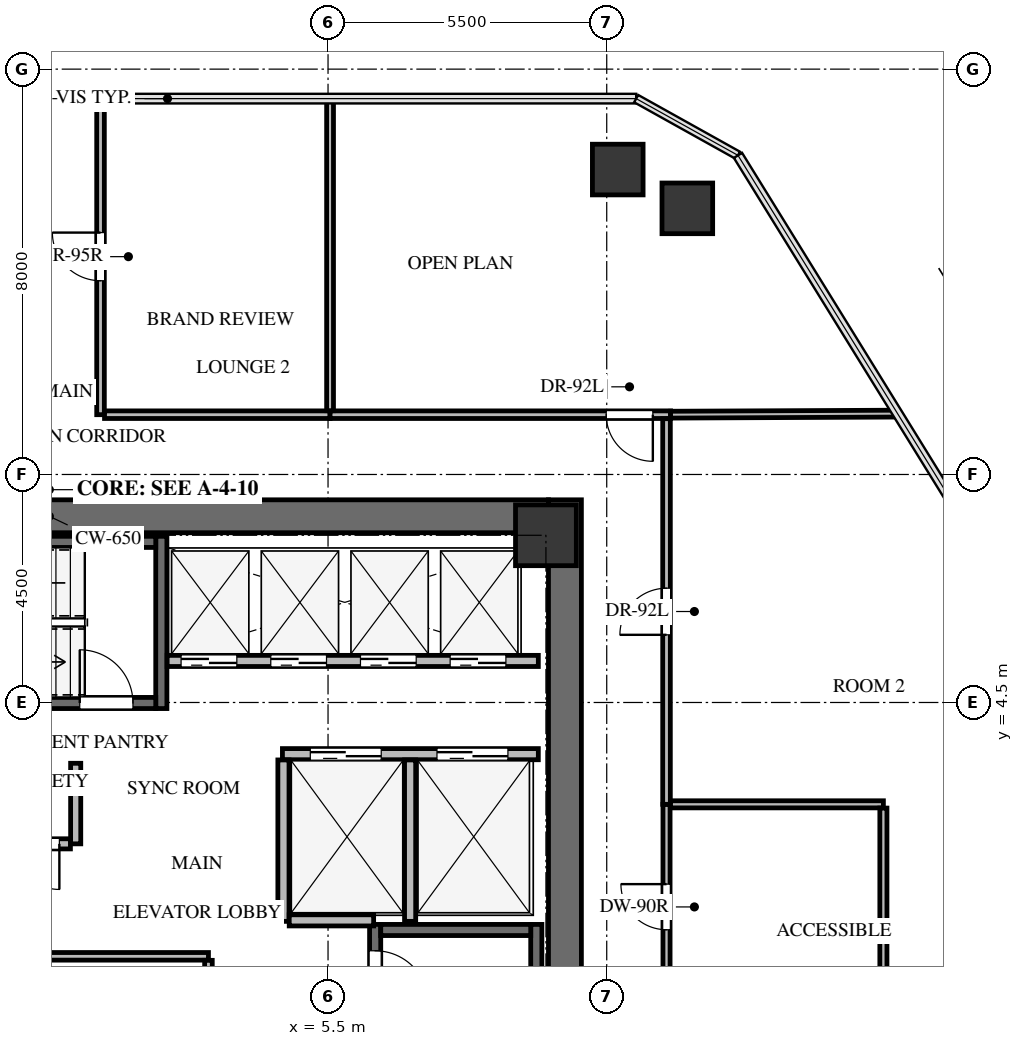
"""IFC4 building model, lengths in metres.
Left out: names, types, materials, properties, quantities, classifications, styles, units other than length and angle.
Written with IfcOpenShell. Run it as: python <this file> out.ifc"""

import sys

from ifc_helpers import new_model, si_unit, direction, frame, frame_2d, origin, origin_2d, place, context, subcontext, project, spatial, rectangle, extrude, source, transform, mapped, element, fill, save


model = new_model("IFC4")
c1 = context("Model", 3, precision=1e-05, world=origin(), true_north=direction((0.0, 1.0)))
c2 = subcontext(c1, "Body", "Model", "MODEL_VIEW")
j1 = project(units=[si_unit("LENGTHUNIT", "METRE"), si_unit("PLANEANGLEUNIT", "RADIAN")], contexts=[c1])
p1 = place(None, origin())
s1 = spatial("IfcSite", under=j1, at=p1, CompositionType="ELEMENT")
p2 = place(p1, origin())
s2 = spatial("IfcBuilding", under=s1, at=p2, CompositionType="ELEMENT")
p3 = place(p2, frame((0.0, 0.0, 193.6)))
s3 = spatial("IfcBuildingStorey", under=s2, at=p3, CompositionType="ELEMENT", Elevation=193.6)
p4 = place(p3, frame((10.175, -8.5, 0.0), z_axis=(0.0, 0.0, 1.0), x_axis=(0.0, 1.0, 0.0)))
e1 = element("IfcWall", 1, at=p4, inside=s3, PredefinedType="SHEAR", context=c2, shape_type="SweptSolid", body=[
    extrude(rectangle(XDim=17.0, YDim=0.65, at=frame_2d((8.5, 0.0))), origin(), (0.0, 0.0, 1.0), 3.3),
])
p5 = place(p3, frame((-9.85, 8.175, 0.0), z_axis=(0.0, 0.0, 1.0), x_axis=(1.0, 0.0, 0.0)))
e2 = element("IfcWall", 2, at=p5, inside=s3, PredefinedType="SHEAR", context=c2, shape_type="SweptSolid", body=[
    extrude(rectangle(XDim=19.7, YDim=0.65, at=frame_2d((9.85, 0.0))), origin(), (0.0, 0.0, 1.0), 3.3),
])
p6 = place(p3, frame((9.61, -7.77, -0.24), z_axis=(0.0, 0.0, 1.0), x_axis=(0.0, 1.0, 0.0)))
e3 = element("IfcWall", 3, at=p6, inside=s3, PredefinedType="SHEAR", context=c2, shape_type="SweptSolid", body=[
    extrude(rectangle(XDim=7.89, YDim=0.22, at=frame_2d((3.945, 0.0))), origin(), (0.0, 0.0, 1.0), 3.3),
])
p7 = place(p3, frame((6.43, 0.12, -0.24), z_axis=(0.0, 0.0, 1.0), x_axis=(0.0, -1.0, 0.0)))
e4 = element("IfcWall", 4, at=p7, inside=s3, PredefinedType="SHEAR", context=c2, shape_type="SweptSolid", body=[
    extrude(rectangle(XDim=7.89, YDim=0.22, at=frame_2d((3.945, 0.0))), origin(), (0.0, 0.0, 1.0), 3.3),
])
p8 = place(p7, frame((0.52, 0.0, 0.0)))
e5 = element("IfcOpeningElement", 5, at=p8, cuts=e4, PredefinedType="OPENING", context=c2, shape_type="SweptSolid", body=[
    extrude(rectangle(XDim=1.05, YDim=2.15, at=frame_2d((0.525, 1.075))), frame((0.0, 0.12, 0.0), z_axis=(0.0, -1.0, 0.0), x_axis=(1.0, 0.0, 0.0)), (0.0, 0.0, 1.0), 0.24),
])
p9 = place(p3, frame((9.5, 0.01, -0.24), z_axis=(0.0, 0.0, 1.0), x_axis=(-1.0, 0.0, 0.0)))
e6 = element("IfcWall", 6, at=p9, inside=s3, PredefinedType="SHEAR", context=c2, shape_type="SweptSolid", body=[
    extrude(rectangle(XDim=2.96, YDim=0.22, at=frame_2d((1.48, 0.0))), origin(), (0.0, 0.0, 1.0), 3.3),
])
p10 = place(p3, frame((2.21, 4.38, -0.24), z_axis=(0.0, 0.0, 1.0), x_axis=(0.0, 1.0, 0.0)))
e7 = element("IfcWall", 7, at=p10, inside=s3, PredefinedType="SHEAR", context=c2, shape_type="SweptSolid", body=[
    extrude(rectangle(XDim=3.4, YDim=0.22, at=frame_2d((1.7, 0.0))), origin(), (0.0, 0.0, 1.0), 3.3),
])
p11 = place(p3, frame((-5.25, 4.49, -0.24), z_axis=(0.0, 0.0, 1.0), x_axis=(1.0, 0.0, 0.0)))
e8 = element("IfcWall", 8, at=p11, inside=s3, PredefinedType="SHEAR", context=c2, shape_type="SweptSolid", body=[
    extrude(rectangle(XDim=7.35, YDim=0.22, at=frame_2d((3.675, 0.0))), origin(), (0.0, 0.0, 1.0), 3.3),
])
p12 = place(p11, frame((5.85, 0.0, 0.0)))
e9 = element("IfcOpeningElement", 9, at=p12, cuts=e8, PredefinedType="OPENING", context=c2, shape_type="SweptSolid", body=[
    extrude(rectangle(XDim=1.05, YDim=2.15, at=frame_2d((0.525, 1.075))), frame((0.0, 0.12, 0.0), z_axis=(0.0, -1.0, 0.0), x_axis=(1.0, 0.0, 0.0)), (0.0, 0.0, 1.0), 0.24),
])
p13 = place(p3, frame((2.1, 7.67, -0.24), z_axis=(0.0, 0.0, 1.0), x_axis=(-1.0, 0.0, 0.0)))
e10 = element("IfcWall", 10, at=p13, inside=s3, PredefinedType="SHEAR", context=c2, shape_type="SweptSolid", body=[
    extrude(rectangle(XDim=7.35, YDim=0.22, at=frame_2d((3.675, 0.0))), origin(), (0.0, 0.0, 1.0), 3.3),
])
m1 = source(origin(), c2, "Body", "SweptSolid", [
    extrude(rectangle(XDim=1.2, YDim=1.2, at=origin_2d()), origin(), (0.0, 0.0, 1.0), 3.3),
])
p14 = place(p3, frame((9.8, 7.8, -0.24), z_axis=(0.0, 0.0, 1.0), x_axis=(1.0, 0.0, 0.0)))
e11 = element("IfcColumn", 11, at=p14, inside=s3, PredefinedType="COLUMN", context=c2, shape_type="MappedRepresentation", body=[
    mapped(m1, transform((0.0, 0.0, 0.0), x_axis=(1.0, 0.0, 0.0), y_axis=(0.0, 1.0, 0.0), z_axis=(0.0, 0.0, 1.0), scale=1.0)),
])
m2 = source(origin(), c2, "Body", "SweptSolid", [
    extrude(rectangle(XDim=1.0, YDim=1.0, at=origin_2d()), origin(), (0.0, 0.0, 1.0), 3.3),
])
for number, where, z_axis, x_axis in (
    (12, (11.218, 15.018, -0.24), (0.0, 0.0, 1.0), (1.0, 0.0, 0.0)),
    (13, (12.591, 14.252, -0.24), (0.0, 0.0, 1.0), (1.0, 0.0, 0.0)),
):
    element("IfcColumn", number, at=place(p3, frame(where, z_axis=z_axis, x_axis=x_axis)), inside=s3, PredefinedType="COLUMN", context=c2, shape_type="MappedRepresentation", body=[
        mapped(m2, transform((0.0, 0.0, 0.0), x_axis=(1.0, 0.0, 0.0), y_axis=(0.0, 1.0, 0.0), z_axis=(0.0, 0.0, 1.0), scale=1.0)),
    ])
p15 = place(p3, frame((4.6, 3.48, 0.0), z_axis=(0.0, 0.0, 1.0), x_axis=(1.0, 0.0, 0.0)))
e14 = element("IfcWall", 14, at=p15, inside=s3, PredefinedType="SOLIDWALL", context=c2, shape_type="SweptSolid", body=[
    extrude(rectangle(XDim=5.05, YDim=0.22, at=frame_2d((2.525, 0.0))), origin(), (0.0, 0.0, 1.0), 3.045),
])
p16 = place(p15, frame((0.55, 0.0, 0.0)))
e15 = element("IfcOpeningElement", 15, at=p16, cuts=e14, PredefinedType="OPENING", context=c2, shape_type="SweptSolid", body=[
    extrude(rectangle(XDim=1.4, YDim=2.15, at=frame_2d((0.7, 1.075))), frame((0.0, 0.12, 0.0), z_axis=(0.0, -1.0, 0.0), x_axis=(1.0, 0.0, 0.0)), (0.0, 0.0, 1.0), 0.24),
])
p17 = place(p15, frame((3.05, 0.0, 0.0)))
e16 = element("IfcOpeningElement", 16, at=p17, cuts=e14, PredefinedType="OPENING", context=c2, shape_type="SweptSolid", body=[
    extrude(rectangle(XDim=1.4, YDim=2.15, at=frame_2d((0.7, 1.075))), frame((0.0, 0.12, 0.0), z_axis=(0.0, -1.0, 0.0), x_axis=(1.0, 0.0, 0.0)), (0.0, 0.0, 1.0), 0.24),
])
for number, where, z_axis, x_axis in (
    (17, (4.62, 0.18, 0.0), (0.0, 0.0, 1.0), (0.0, 1.0, 0.0)),
    (18, (7.12, 0.18, 0.0), (0.0, 0.0, 1.0), (0.0, 1.0, 0.0)),
):
    element("IfcWall", number, at=place(p3, frame(where, z_axis=z_axis, x_axis=x_axis)), inside=s3, PredefinedType="SOLIDWALL", context=c2, shape_type="SweptSolid", body=[
        extrude(rectangle(XDim=3.186, YDim=0.22, at=frame_2d((1.593, 0.0))), origin(), (0.0, 0.0, 1.0), 3.045),
    ])
p18 = place(p3, frame((4.734, 0.2, 0.0), z_axis=(0.0, 0.0, 1.0), x_axis=(1.0, 0.0, 0.0)))
e19 = element("IfcWall", 19, at=p18, inside=s3, PredefinedType="SOLIDWALL", context=c2, shape_type="SweptSolid", body=[
    extrude(rectangle(XDim=1.666, YDim=0.22, at=frame_2d((0.833, 0.0))), origin(), (0.0, 0.0, 1.0), 3.045),
])
p19 = place(p3, frame((2.325, 5.32, 0.0), z_axis=(0.0, 0.0, 1.0), x_axis=(1.0, 0.0, 0.0)))
e20 = element("IfcWall", 20, at=p19, inside=s3, PredefinedType="SOLIDWALL", context=c2, shape_type="SweptSolid", body=[
    extrude(rectangle(XDim=7.325, YDim=0.22, at=frame_2d((3.663, 0.0))), origin(), (0.0, 0.0, 1.0), 3.045),
])
p20 = place(p19, frame((0.275, 0.0, 0.0)))
e21 = element("IfcOpeningElement", 21, at=p20, cuts=e20, PredefinedType="OPENING", context=c2, shape_type="SweptSolid", body=[
    extrude(rectangle(XDim=1.1, YDim=2.15, at=frame_2d((0.55, 1.075))), frame((0.0, 0.12, 0.0), z_axis=(0.0, -1.0, 0.0), x_axis=(1.0, 0.0, 0.0)), (0.0, 0.0, 1.0), 0.24),
])
p21 = place(p19, frame((2.045, 0.0, 0.0)))
e22 = element("IfcOpeningElement", 22, at=p21, cuts=e20, PredefinedType="OPENING", context=c2, shape_type="SweptSolid", body=[
    extrude(rectangle(XDim=1.1, YDim=2.15, at=frame_2d((0.55, 1.075))), frame((0.0, 0.12, 0.0), z_axis=(0.0, -1.0, 0.0), x_axis=(1.0, 0.0, 0.0)), (0.0, 0.0, 1.0), 0.24),
])
p22 = place(p19, frame((3.815, 0.0, 0.0)))
e23 = element("IfcOpeningElement", 23, at=p22, cuts=e20, PredefinedType="OPENING", context=c2, shape_type="SweptSolid", body=[
    extrude(rectangle(XDim=1.1, YDim=2.15, at=frame_2d((0.55, 1.075))), frame((0.0, 0.12, 0.0), z_axis=(0.0, -1.0, 0.0), x_axis=(1.0, 0.0, 0.0)), (0.0, 0.0, 1.0), 0.24),
])
p23 = place(p19, frame((5.585, 0.0, 0.0)))
e24 = element("IfcOpeningElement", 24, at=p23, cuts=e20, PredefinedType="OPENING", context=c2, shape_type="SweptSolid", body=[
    extrude(rectangle(XDim=1.1, YDim=2.15, at=frame_2d((0.55, 1.075))), frame((0.0, 0.12, 0.0), z_axis=(0.0, -1.0, 0.0), x_axis=(1.0, 0.0, 0.0)), (0.0, 0.0, 1.0), 0.24),
])
p24 = place(p3, frame((-0.59, -0.51, 0.0), z_axis=(0.0, 0.0, 1.0), x_axis=(1.0, 0.0, 0.0)))
e25 = element("IfcWall", 25, at=p24, inside=s3, PredefinedType="PARTITIONING", context=c2, shape_type="SweptSolid", body=[
    extrude(rectangle(XDim=3.73, YDim=0.15, at=frame_2d((1.865, 0.0))), origin(), (0.0, 0.0, 1.0), 3.045),
])
p25 = place(p3, frame((3.14, -0.589, 0.0), z_axis=(0.0, 0.0, 1.0), x_axis=(0.0, -1.0, 0.0)))
e26 = element("IfcWall", 26, at=p25, inside=s3, PredefinedType="PARTITIONING", context=c2, shape_type="SweptSolid", body=[
    extrude(rectangle(XDim=2.372, YDim=0.15, at=frame_2d((1.186, 0.0))), origin(), (0.0, 0.0, 1.0), 3.045),
])
p26 = place(p3, frame((0.52, 3.3, 0.0), z_axis=(0.0, 0.0, 1.0), x_axis=(0.0, -1.0, 0.0)))
e27 = element("IfcWall", 27, at=p26, inside=s3, PredefinedType="SOLIDWALL", context=c2, shape_type="SweptSolid", body=[
    extrude(rectangle(XDim=1.59, YDim=0.2, at=frame_2d((0.795, 0.0))), origin(), (0.0, 0.0, 1.0), 3.045),
])
p27 = place(p3, frame((0.416, 1.71, 0.0), z_axis=(0.0, 0.0, 1.0), x_axis=(-1.0, 0.0, 0.0)))
e28 = element("IfcWall", 28, at=p27, inside=s3, PredefinedType="SOLIDWALL", context=c2, shape_type="SweptSolid", body=[
    extrude(rectangle(XDim=1.336, YDim=0.2, at=frame_2d((0.668, 0.0))), origin(), (0.0, 0.0, 1.0), 3.045),
])
p28 = place(p27, frame((0.218, 0.0, 0.0)))
e29 = element("IfcOpeningElement", 29, at=p28, cuts=e28, PredefinedType="OPENING", context=c2, shape_type="SweptSolid", body=[
    extrude(rectangle(XDim=0.9, YDim=2.05, at=frame_2d((0.45, 1.025))), frame((0.0, 0.11, 0.0), z_axis=(0.0, -1.0, 0.0), x_axis=(1.0, 0.0, 0.0)), (0.0, 0.0, 1.0), 0.22),
])
p29 = place(p3, frame((12.18, -1.56, 0.0), z_axis=(0.0, 0.0, 1.0), x_axis=(0.0, 1.0, 0.0)))
e30 = element("IfcWall", 30, at=p29, inside=s3, PredefinedType="PARTITIONING", context=c2, shape_type="SweptSolid", body=[
    extrude(rectangle(XDim=4.05, YDim=0.14, at=frame_2d((2.025, 0.0))), origin(), (0.0, 0.0, 1.0), 2.242),
])
p30 = place(p29, frame((1.575, 0.0, 0.0)))
e31 = element("IfcOpeningElement", 31, at=p30, cuts=e30, PredefinedType="OPENING", context=c2, shape_type="SweptSolid", body=[
    extrude(rectangle(XDim=0.9, YDim=2.05, at=frame_2d((0.45, 1.025))), frame((0.0, 0.08, 0.0), z_axis=(0.0, -1.0, 0.0), x_axis=(1.0, 0.0, 0.0)), (0.0, 0.0, 1.0), 0.16),
])
p31 = place(p3, frame((1.01, 10.18, 0.0), z_axis=(0.0, 0.0, 1.0), x_axis=(0.0, 1.0, 0.0)))
e32 = element("IfcWall", 32, at=p31, inside=s3, PredefinedType="PARTITIONING", context=c2, shape_type="SweptSolid", body=[
    extrude(rectangle(XDim=6.238, YDim=0.15, at=frame_2d((3.119, 0.0))), origin(), (0.0, 0.0, 1.0), 2.399),
])
p32 = place(p31, frame((2.644, 0.0, 0.0)))
e33 = element("IfcOpeningElement", 33, at=p32, cuts=e32, PredefinedType="OPENING", context=c2, shape_type="SweptSolid", body=[
    extrude(rectangle(XDim=0.95, YDim=2.1, at=frame_2d((0.475, 1.05))), frame((0.0, 0.085, 0.0), z_axis=(0.0, -1.0, 0.0), x_axis=(1.0, 0.0, 0.0)), (0.0, 0.0, 1.0), 0.17),
])
p33 = place(p3, frame((5.54, 10.18, 0.0), z_axis=(0.0, 0.0, 1.0), x_axis=(-1.0, 0.0, 0.0)))
e34 = element("IfcWall", 34, at=p33, inside=s3, PredefinedType="PARTITIONING", context=c2, shape_type="SweptSolid", body=[
    extrude(rectangle(XDim=4.451, YDim=0.15, at=frame_2d((2.226, 0.0))), origin(), (0.0, 0.0, 1.0), 2.608),
])
p34 = place(p3, frame((12.26, 10.18, 0.0), z_axis=(0.0, 0.0, 1.0), x_axis=(-1.0, 0.0, 0.0)))
e35 = element("IfcWall", 35, at=p34, inside=s3, PredefinedType="PARTITIONING", context=c2, shape_type="SweptSolid", body=[
    extrude(rectangle(XDim=6.72, YDim=0.15, at=frame_2d((3.36, 0.0))), origin(), (0.0, 0.0, 1.0), 2.242),
])
p35 = place(p34, frame((0.35, 0.0, 0.0)))
e36 = element("IfcOpeningElement", 36, at=p35, cuts=e35, PredefinedType="OPENING", context=c2, shape_type="SweptSolid", body=[
    extrude(rectangle(XDim=0.92, YDim=2.1, at=frame_2d((0.46, 1.05))), frame((0.0, 0.085, 0.0), z_axis=(0.0, -1.0, 0.0), x_axis=(1.0, 0.0, 0.0)), (0.0, 0.0, 1.0), 0.17),
])
p36 = place(p3, frame((12.18, 2.49, 0.0), z_axis=(0.0, 0.0, 1.0), x_axis=(0.0, 1.0, 0.0)))
e37 = element("IfcWall", 37, at=p36, inside=s3, PredefinedType="PARTITIONING", context=c2, shape_type="SweptSolid", body=[
    extrude(rectangle(XDim=7.611, YDim=0.15, at=frame_2d((3.806, 0.0))), origin(), (0.0, 0.0, 1.0), 3.045),
])
p37 = place(p36, frame((3.345, 0.0, 0.0)))
e38 = element("IfcOpeningElement", 38, at=p37, cuts=e37, PredefinedType="OPENING", context=c2, shape_type="SweptSolid", body=[
    extrude(rectangle(XDim=0.92, YDim=2.1, at=frame_2d((0.46, 1.05))), frame((0.0, 0.085, 0.0), z_axis=(0.0, -1.0, 0.0), x_axis=(1.0, 0.0, 0.0)), (0.0, 0.0, 1.0), 0.17),
])
p38 = place(p3, frame((12.259, 2.49, 0.0), z_axis=(0.0, 0.0, 1.0), x_axis=(1.0, 0.0, 0.0)))
e39 = element("IfcWall", 39, at=p38, inside=s3, PredefinedType="PARTITIONING", context=c2, shape_type="SweptSolid", body=[
    extrude(rectangle(XDim=4.201, YDim=0.14, at=frame_2d((2.101, 0.0))), origin(), (0.0, 0.0, 1.0), 3.045),
])
p39 = place(p3, frame((16.46, 2.416, 0.0), z_axis=(0.0, 0.0, 1.0), x_axis=(0.0, -1.0, 0.0)))
e40 = element("IfcWall", 40, at=p39, inside=s3, PredefinedType="PARTITIONING", context=c2, shape_type="SweptSolid", body=[
    extrude(rectangle(XDim=3.902, YDim=0.14, at=frame_2d((1.951, 0.0))), origin(), (0.0, 0.0, 1.0), 2.242),
])
p40 = place(p3, frame((5.54, 16.418, 0.0), z_axis=(0.0, 0.0, 1.0), x_axis=(0.0, -1.0, 0.0)))
e41 = element("IfcWall", 41, at=p40, inside=s3, PredefinedType="PARTITIONING", context=c2, shape_type="SweptSolid", body=[
    extrude(rectangle(XDim=6.159, YDim=0.135, at=frame_2d((3.08, 0.0))), origin(), (0.0, 0.0, 1.0), 2.399),
])
p41 = place(p3, frame((16.74, 10.201, 0.0), z_axis=(0.0, 0.0, 1.0), x_axis=(-0.999989522694, -0.004577608714, 0.0)))
e42 = element("IfcWall", 42, at=p41, inside=s3, PredefinedType="PARTITIONING", context=c2, shape_type="SweptSolid", body=[
    extrude(rectangle(XDim=4.48, YDim=0.135, at=frame_2d((2.24, 0.0))), origin(), (0.0, 0.0, 1.0), 2.399),
])
m3 = source(origin(), c2, "Body", "SweptSolid", [
    extrude(rectangle(XDim=1.05, YDim=2.15, at=frame_2d((0.525, 1.075))), frame((0.0, 0.025, 0.0), z_axis=(0.0, -1.0, 0.0), x_axis=(1.0, 0.0, 0.0)), (0.0, 0.0, 1.0), 0.05),
])
p42 = place(p8, origin())
e43 = element("IfcDoor", 43, at=p42, inside=s3, OperationType="SINGLE_SWING_RIGHT", PredefinedType="DOOR", context=c2, shape_type="MappedRepresentation", body=[
    mapped(m3, transform((0.0, 0.0, 0.0), x_axis=(1.0, 0.0, 0.0), y_axis=(0.0, 1.0, 0.0), z_axis=(0.0, 0.0, 1.0), scale=1.0)),
])
fill(e5, e43)
m4 = source(origin(), c2, "Body", "SweptSolid", [
    extrude(rectangle(XDim=1.05, YDim=2.15, at=frame_2d((0.525, 1.075))), frame((0.0, 0.025, 0.0), z_axis=(0.0, -1.0, 0.0), x_axis=(1.0, 0.0, 0.0)), (0.0, 0.0, 1.0), 0.05),
])
p43 = place(p12, origin())
e44 = element("IfcDoor", 44, at=p43, inside=s3, OperationType="SINGLE_SWING_LEFT", PredefinedType="DOOR", context=c2, shape_type="MappedRepresentation", body=[
    mapped(m4, transform((0.0, 0.0, 0.0), x_axis=(1.0, 0.0, 0.0), y_axis=(0.0, 1.0, 0.0), z_axis=(0.0, 0.0, 1.0), scale=1.0)),
])
fill(e9, e44)
m5 = source(origin(), c2, "Body", "SweptSolid", [
    extrude(rectangle(XDim=1.4, YDim=2.15, at=frame_2d((0.7, 1.075))), frame((0.0, 0.025, 0.0), z_axis=(0.0, -1.0, 0.0), x_axis=(1.0, 0.0, 0.0)), (0.0, 0.0, 1.0), 0.05),
])
p44 = place(p16, origin())
e45 = element("IfcDoor", 45, at=p44, inside=s3, OperationType="DOUBLE_DOOR_SLIDING", PredefinedType="DOOR", context=c2, shape_type="MappedRepresentation", body=[
    mapped(m5, transform((0.0, 0.0, 0.0), x_axis=(1.0, 0.0, 0.0), y_axis=(0.0, 1.0, 0.0), z_axis=(0.0, 0.0, 1.0), scale=1.0)),
])
fill(e15, e45)
p45 = place(p17, origin())
e46 = element("IfcDoor", 46, at=p45, inside=s3, OperationType="DOUBLE_DOOR_SLIDING", PredefinedType="DOOR", context=c2, shape_type="MappedRepresentation", body=[
    mapped(m5, transform((0.0, 0.0, 0.0), x_axis=(1.0, 0.0, 0.0), y_axis=(0.0, 1.0, 0.0), z_axis=(0.0, 0.0, 1.0), scale=1.0)),
])
fill(e16, e46)
m6 = source(origin(), c2, "Body", "SweptSolid", [
    extrude(rectangle(XDim=1.1, YDim=2.15, at=frame_2d((0.55, 1.075))), frame((0.0, 0.025, 0.0), z_axis=(0.0, -1.0, 0.0), x_axis=(1.0, 0.0, 0.0)), (0.0, 0.0, 1.0), 0.05),
])
p46 = place(p20, origin())
e47 = element("IfcDoor", 47, at=p46, inside=s3, OperationType="DOUBLE_DOOR_SLIDING", PredefinedType="DOOR", context=c2, shape_type="MappedRepresentation", body=[
    mapped(m6, transform((0.0, 0.0, 0.0), x_axis=(1.0, 0.0, 0.0), y_axis=(0.0, 1.0, 0.0), z_axis=(0.0, 0.0, 1.0), scale=1.0)),
])
fill(e21, e47)
p47 = place(p21, origin())
e48 = element("IfcDoor", 48, at=p47, inside=s3, OperationType="DOUBLE_DOOR_SLIDING", PredefinedType="DOOR", context=c2, shape_type="MappedRepresentation", body=[
    mapped(m6, transform((0.0, 0.0, 0.0), x_axis=(1.0, 0.0, 0.0), y_axis=(0.0, 1.0, 0.0), z_axis=(0.0, 0.0, 1.0), scale=1.0)),
])
fill(e22, e48)
p48 = place(p22, origin())
e49 = element("IfcDoor", 49, at=p48, inside=s3, OperationType="DOUBLE_DOOR_SLIDING", PredefinedType="DOOR", context=c2, shape_type="MappedRepresentation", body=[
    mapped(m6, transform((0.0, 0.0, 0.0), x_axis=(1.0, 0.0, 0.0), y_axis=(0.0, 1.0, 0.0), z_axis=(0.0, 0.0, 1.0), scale=1.0)),
])
fill(e23, e49)
p49 = place(p23, origin())
e50 = element("IfcDoor", 50, at=p49, inside=s3, OperationType="DOUBLE_DOOR_SLIDING", PredefinedType="DOOR", context=c2, shape_type="MappedRepresentation", body=[
    mapped(m6, transform((0.0, 0.0, 0.0), x_axis=(1.0, 0.0, 0.0), y_axis=(0.0, 1.0, 0.0), z_axis=(0.0, 0.0, 1.0), scale=1.0)),
])
fill(e24, e50)
m7 = source(origin(), c2, "Body", "SweptSolid", [
    extrude(rectangle(XDim=0.9, YDim=2.05, at=frame_2d((0.45, 1.025))), frame((0.0, 0.025, 0.0), z_axis=(0.0, -1.0, 0.0), x_axis=(1.0, 0.0, 0.0)), (0.0, 0.0, 1.0), 0.05),
])
p50 = place(p28, origin())
e51 = element("IfcDoor", 51, at=p50, inside=s3, OperationType="SINGLE_SWING_LEFT", PredefinedType="DOOR", context=c2, shape_type="MappedRepresentation", body=[
    mapped(m7, transform((0.0, 0.0, 0.0), x_axis=(1.0, 0.0, 0.0), y_axis=(0.0, 1.0, 0.0), z_axis=(0.0, 0.0, 1.0), scale=1.0)),
])
fill(e29, e51)
m8 = source(origin(), c2, "Body", "SweptSolid", [
    extrude(rectangle(XDim=0.9, YDim=2.05, at=frame_2d((0.45, 1.025))), frame((0.0, 0.025, 0.0), z_axis=(0.0, -1.0, 0.0), x_axis=(1.0, 0.0, 0.0)), (0.0, 0.0, 1.0), 0.05),
])
p51 = place(p30, origin())
e52 = element("IfcDoor", 52, at=p51, inside=s3, OperationType="SINGLE_SWING_RIGHT", PredefinedType="DOOR", context=c2, shape_type="MappedRepresentation", body=[
    mapped(m8, transform((0.0, 0.0, 0.0), x_axis=(1.0, 0.0, 0.0), y_axis=(0.0, 1.0, 0.0), z_axis=(0.0, 0.0, 1.0), scale=1.0)),
])
fill(e31, e52)
m9 = source(origin(), c2, "Body", "SweptSolid", [
    extrude(rectangle(XDim=0.95, YDim=2.1, at=frame_2d((0.475, 1.05))), frame((0.0, 0.025, 0.0), z_axis=(0.0, -1.0, 0.0), x_axis=(1.0, 0.0, 0.0)), (0.0, 0.0, 1.0), 0.05),
])
p52 = place(p32, origin())
e53 = element("IfcDoor", 53, at=p52, inside=s3, OperationType="SINGLE_SWING_RIGHT", PredefinedType="DOOR", context=c2, shape_type="MappedRepresentation", body=[
    mapped(m9, transform((0.0, 0.0, 0.0), x_axis=(1.0, 0.0, 0.0), y_axis=(0.0, 1.0, 0.0), z_axis=(0.0, 0.0, 1.0), scale=1.0)),
])
fill(e33, e53)
m10 = source(origin(), c2, "Body", "SweptSolid", [
    extrude(rectangle(XDim=0.92, YDim=2.1, at=frame_2d((0.46, 1.05))), frame((0.0, 0.025, 0.0), z_axis=(0.0, -1.0, 0.0), x_axis=(1.0, 0.0, 0.0)), (0.0, 0.0, 1.0), 0.05),
])
p53 = place(p35, origin())
e54 = element("IfcDoor", 54, at=p53, inside=s3, OperationType="SINGLE_SWING_LEFT", PredefinedType="DOOR", context=c2, shape_type="MappedRepresentation", body=[
    mapped(m10, transform((0.0, 0.0, 0.0), x_axis=(1.0, 0.0, 0.0), y_axis=(0.0, 1.0, 0.0), z_axis=(0.0, 0.0, 1.0), scale=1.0)),
])
fill(e36, e54)
p54 = place(p37, origin())
e55 = element("IfcDoor", 55, at=p54, inside=s3, OperationType="SINGLE_SWING_LEFT", PredefinedType="DOOR", context=c2, shape_type="MappedRepresentation", body=[
    mapped(m10, transform((0.0, 0.0, 0.0), x_axis=(1.0, 0.0, 0.0), y_axis=(0.0, 1.0, 0.0), z_axis=(0.0, 0.0, 1.0), scale=1.0)),
])
fill(e38, e55)
save(model, sys.argv[1])
